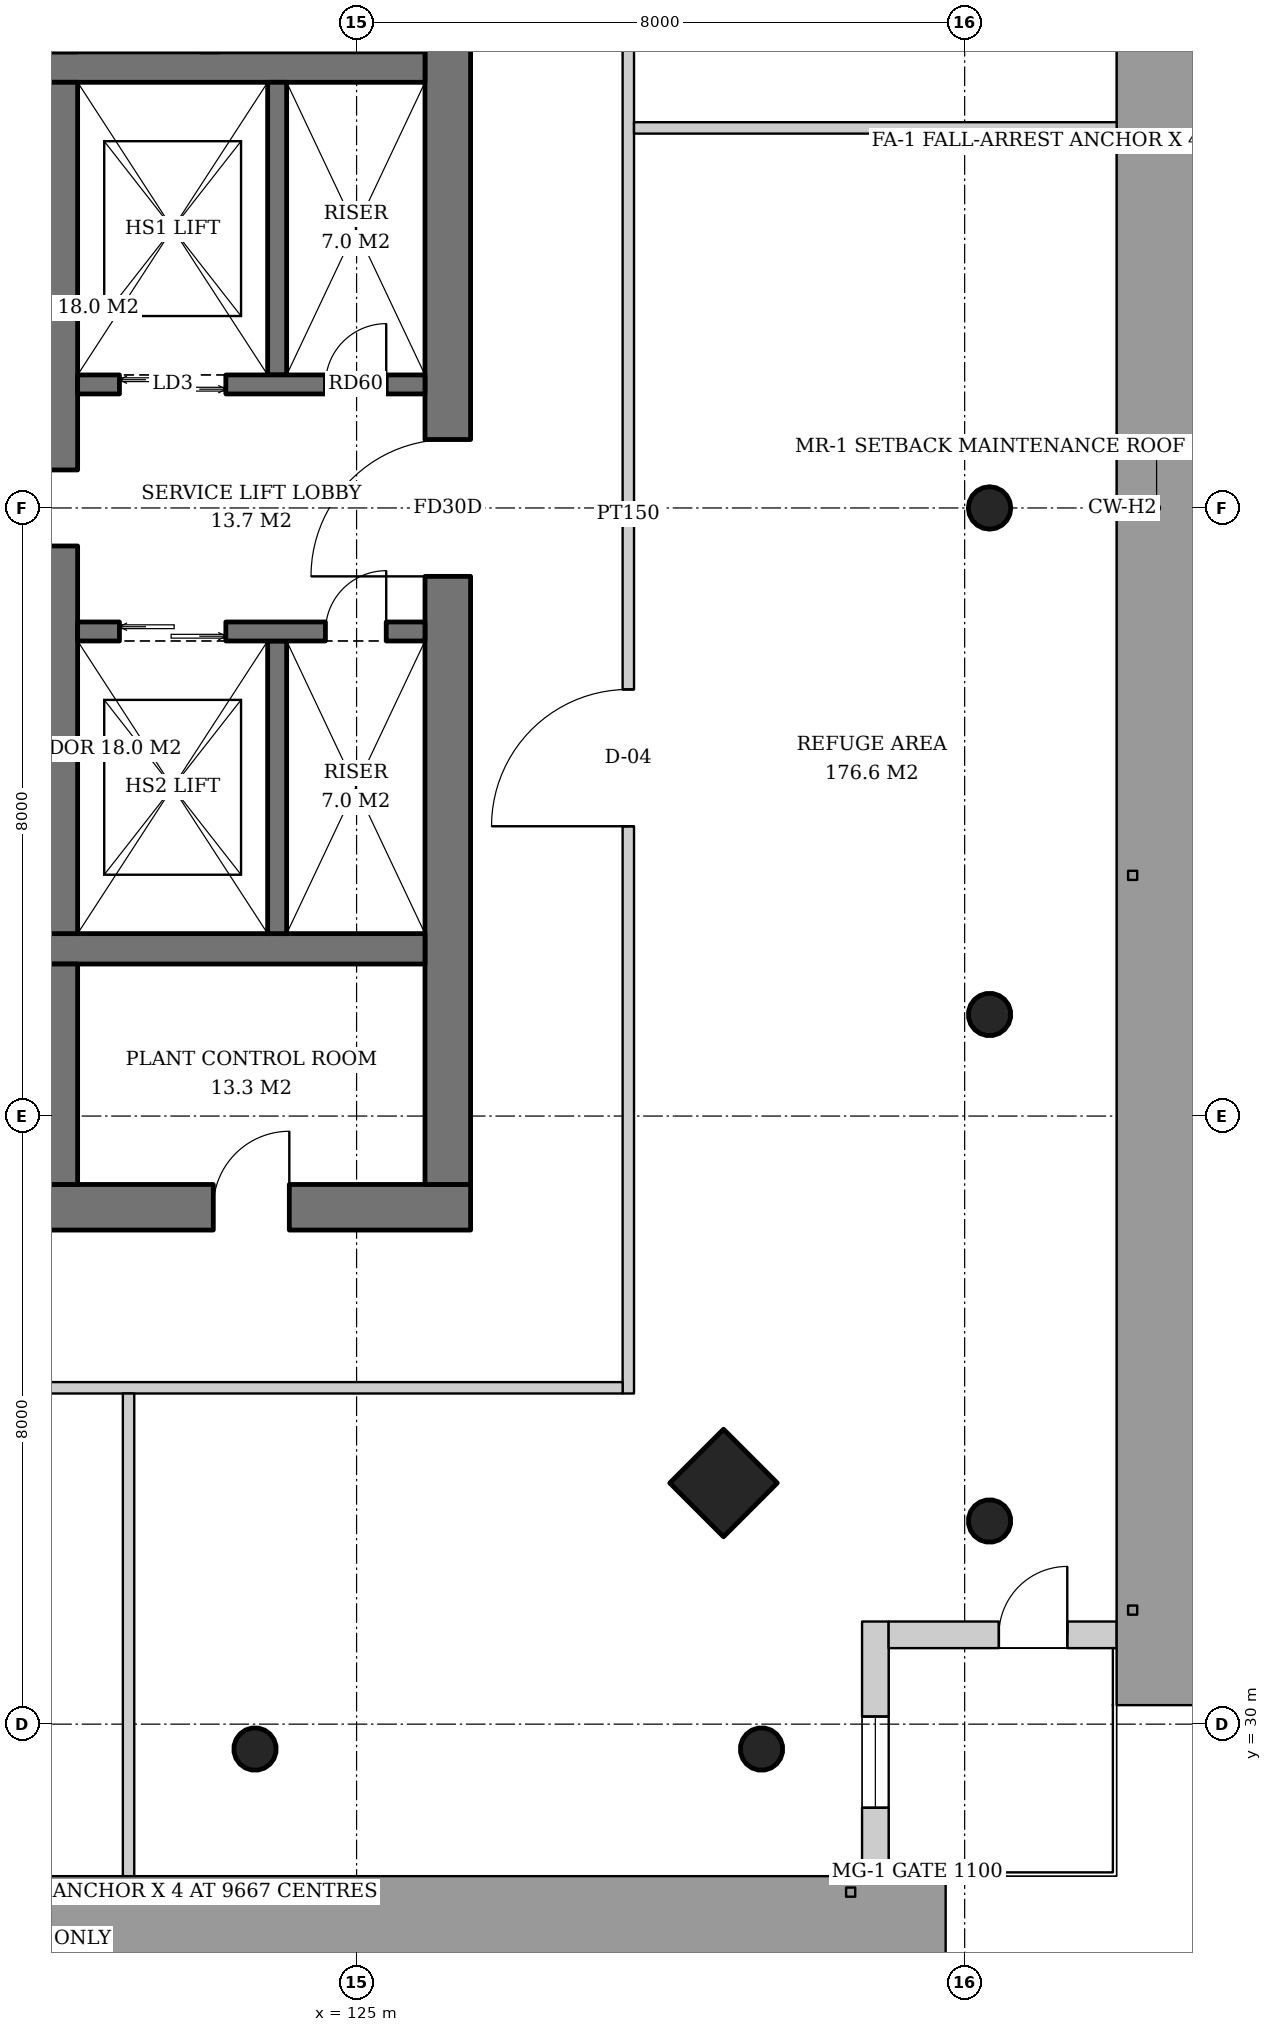
"""IFC4 building model, lengths in metres.
Left out: names, types, materials, properties, quantities, classifications, styles, units other than length and angle.
Written with IfcOpenShell. Run it as: python <this file> out.ifc"""

import sys

from ifc_helpers import new_model, si_unit, direction, frame, frame_2d, origin, origin_2d, place, context, subcontext, project, spatial, rectangle, hollow_circle, extrude, element, fill, save


model = new_model("IFC4")
c1 = context("Model", 3, precision=1e-05, world=origin(), true_north=direction((0.0, 1.0)))
c2 = subcontext(c1, "Body", "Model", "MODEL_VIEW")
j1 = project(units=[si_unit("LENGTHUNIT", "METRE"), si_unit("PLANEANGLEUNIT", "RADIAN")], contexts=[c1])
p1 = place(None, origin())
s1 = spatial("IfcSite", under=j1, at=p1, CompositionType="ELEMENT")
p2 = place(p1, origin())
s2 = spatial("IfcBuilding", under=s1, at=p2, CompositionType="ELEMENT")
p3 = place(p2, frame((0.0, 0.0, 81.8)))
s3 = spatial("IfcBuildingStorey", under=s2, at=p3, CompositionType="ELEMENT", Elevation=81.8)
p4 = place(p3, frame((133.379, 32.621, 0.0), z_axis=(-0.043029647111, 0.043029647111, 0.998146732169), x_axis=(-0.707106781187, -0.707106781187, 0.0)))
e1 = element("IfcColumn", 1, at=p4, inside=s3, PredefinedType="COLUMN", context=c2, shape_type="SweptSolid", body=[
    extrude(hollow_circle(Radius=0.28, WallThickness=0.02, at=origin_2d()), origin(), (0.0, 0.0, 1.0), 3.807),
])
p5 = place(p3, frame((133.379, 39.31, 0.0), z_axis=(-0.043059525333, 0.021561848751, 0.998839808957), x_axis=(-0.44774654769, -0.894160516368, 0.0)))
e2 = element("IfcColumn", 2, at=p5, inside=s3, PredefinedType="COLUMN", context=c2, shape_type="SweptSolid", body=[
    extrude(hollow_circle(Radius=0.28, WallThickness=0.02, at=origin_2d()), origin(), (0.0, 0.0, 1.0), 3.804),
])
p6 = place(p3, frame((133.379, 46.0, 0.0), z_axis=(-0.043069538298, 0.0, 0.999072076915), x_axis=(0.0, -1.0, 0.0)))
e3 = element("IfcColumn", 3, at=p6, inside=s3, PredefinedType="COLUMN", context=c2, shape_type="SweptSolid", body=[
    extrude(hollow_circle(Radius=0.28, WallThickness=0.02, at=origin_2d()), origin(), (0.0, 0.0, 1.0), 3.803),
])
p7 = place(p3, frame((129.879, 33.121, 0.0), z_axis=(-0.043029647111, 0.043029647111, 0.998146732169), x_axis=(-0.707106781187, -0.707106781187, 0.0)))
e4 = element("IfcColumn", 4, at=p7, inside=s3, PredefinedType="COLUMN", context=c2, shape_type="SweptSolid", body=[
    extrude(rectangle(XDim=1.0, YDim=1.0, at=origin_2d()), origin(), (0.0, 0.0, 1.0), 3.807),
])
p8 = place(p3, frame((130.379, 29.621, 0.0), z_axis=(-0.043029647111, 0.043029647111, 0.998146732169), x_axis=(-0.707106781187, -0.707106781187, 0.0)))
e5 = element("IfcColumn", 5, at=p8, inside=s3, PredefinedType="COLUMN", context=c2, shape_type="SweptSolid", body=[
    extrude(hollow_circle(Radius=0.28, WallThickness=0.02, at=origin_2d()), origin(), (0.0, 0.0, 1.0), 3.807),
])
p9 = place(p3, frame((123.69, 29.621, 0.0), z_axis=(-0.021561848751, 0.043059525333, 0.998839808957), x_axis=(-0.894160516368, -0.44774654769, 0.0)))
e6 = element("IfcColumn", 6, at=p9, inside=s3, PredefinedType="COLUMN", context=c2, shape_type="SweptSolid", body=[
    extrude(hollow_circle(Radius=0.28, WallThickness=0.02, at=origin_2d()), origin(), (0.0, 0.0, 1.0), 3.804),
])
p10 = place(p3, frame((107.5, 36.8, 0.0), z_axis=(0.0, 0.0, 1.0), x_axis=(1.0, 0.0, 0.0)))
e7 = element("IfcWall", 7, at=p10, inside=s3, PredefinedType="SHEAR", context=c2, shape_type="SweptSolid", body=[
    extrude(rectangle(XDim=19.0, YDim=0.6, at=frame_2d((9.5, 0.0))), origin(), (0.0, 0.0, 1.0), 3.8),
])
p11 = place(p10, frame((3.9, 0.0, 0.0)))
e8 = element("IfcOpeningElement", 8, at=p11, cuts=e7, PredefinedType="OPENING", context=c2, shape_type="SweptSolid", body=[
    extrude(rectangle(XDim=1.0, YDim=2.1, at=frame_2d((0.5, 1.05))), frame((0.0, 0.31, 0.0), z_axis=(0.0, -1.0, 0.0), x_axis=(1.0, 0.0, 0.0)), (0.0, 0.0, 1.0), 0.62),
])
p12 = place(p10, frame((15.615, 0.0, 0.0)))
e9 = element("IfcOpeningElement", 9, at=p12, cuts=e7, PredefinedType="OPENING", context=c2, shape_type="SweptSolid", body=[
    extrude(rectangle(XDim=1.0, YDim=2.1, at=frame_2d((0.5, 1.05))), frame((0.0, 0.31, 0.0), z_axis=(0.0, -1.0, 0.0), x_axis=(1.0, 0.0, 0.0)), (0.0, 0.0, 1.0), 0.62),
])
p13 = place(p3, frame((126.2, 37.1, 0.0), z_axis=(0.0, 0.0, 1.0), x_axis=(0.0, 1.0, 0.0)))
e10 = element("IfcWall", 10, at=p13, inside=s3, PredefinedType="SHEAR", context=c2, shape_type="SweptSolid", body=[
    extrude(rectangle(XDim=17.8, YDim=0.6, at=frame_2d((8.9, 0.0))), origin(), (0.0, 0.0, 1.0), 3.8),
])
p14 = place(p13, frame((8.0, 0.0, 0.0)))
e11 = element("IfcOpeningElement", 11, at=p14, cuts=e10, PredefinedType="OPENING", context=c2, shape_type="SweptSolid", body=[
    extrude(rectangle(XDim=1.8, YDim=2.4, at=frame_2d((0.9, 1.2))), frame((0.0, 0.31, 0.0), z_axis=(0.0, -1.0, 0.0), x_axis=(1.0, 0.0, 0.0)), (0.0, 0.0, 1.0), 0.62),
])
p15 = place(p3, frame((108.1, 40.2, 0.0), z_axis=(0.0, 0.0, 1.0), x_axis=(1.0, 0.0, 0.0)))
e12 = element("IfcWall", 12, at=p15, inside=s3, PredefinedType="SHEAR", context=c2, shape_type="SweptSolid", body=[
    extrude(rectangle(XDim=17.8, YDim=0.4, at=frame_2d((8.9, 0.0))), origin(), (0.0, 0.0, 1.0), 3.8),
])
p16 = place(p15, frame((3.3, 0.0, 0.0)))
e13 = element("IfcOpeningElement", 13, at=p16, cuts=e12, PredefinedType="OPENING", context=c2, shape_type="SweptSolid", body=[
    extrude(rectangle(XDim=1.0, YDim=2.1, at=frame_2d((0.5, 1.05))), frame((0.0, 0.21, 0.0), z_axis=(0.0, -1.0, 0.0), x_axis=(1.0, 0.0, 0.0)), (0.0, 0.0, 1.0), 0.42),
])
p17 = place(p3, frame((108.1, 51.8, 0.0), z_axis=(0.0, 0.0, 1.0), x_axis=(1.0, 0.0, 0.0)))
e14 = element("IfcWall", 14, at=p17, inside=s3, PredefinedType="SHEAR", context=c2, shape_type="SweptSolid", body=[
    extrude(rectangle(XDim=17.8, YDim=0.4, at=frame_2d((8.9, 0.0))), origin(), (0.0, 0.0, 1.0), 3.8),
])
p18 = place(p17, frame((11.33, 0.0, 0.0)))
e15 = element("IfcOpeningElement", 15, at=p18, cuts=e14, PredefinedType="OPENING", context=c2, shape_type="SweptSolid", body=[
    extrude(rectangle(XDim=1.0, YDim=2.1, at=frame_2d((0.5, 1.05))), frame((0.0, 0.21, 0.0), z_axis=(0.0, -1.0, 0.0), x_axis=(1.0, 0.0, 0.0)), (0.0, 0.0, 1.0), 0.42),
])
p19 = place(p3, frame((121.13, 37.1, 0.0), z_axis=(0.0, 0.0, 1.0), x_axis=(0.0, 1.0, 0.0)))
e16 = element("IfcWall", 16, at=p19, inside=s3, PredefinedType="SHEAR", context=c2, shape_type="SweptSolid", body=[
    extrude(rectangle(XDim=2.9, YDim=0.4, at=frame_2d((1.45, 0.0))), origin(), (0.0, 0.0, 1.0), 3.8),
])
p20 = place(p3, frame((121.13, 40.4, 0.0), z_axis=(0.0, 0.0, 1.0), x_axis=(0.0, 1.0, 0.0)))
e17 = element("IfcWall", 17, at=p20, inside=s3, PredefinedType="SHEAR", context=c2, shape_type="SweptSolid", body=[
    extrude(rectangle(XDim=11.2, YDim=0.4, at=frame_2d((5.6, 0.0))), origin(), (0.0, 0.0, 1.0), 3.8),
])
p21 = place(p20, frame((5.1, 0.0, 0.0)))
e18 = element("IfcOpeningElement", 18, at=p21, cuts=e17, PredefinedType="OPENING", context=c2, shape_type="SweptSolid", body=[
    extrude(rectangle(XDim=1.0, YDim=2.1, at=frame_2d((0.5, 1.05))), frame((0.0, 0.21, 0.0), z_axis=(0.0, -1.0, 0.0), x_axis=(1.0, 0.0, 0.0)), (0.0, 0.0, 1.0), 0.42),
])
p22 = place(p3, frame((131.825, 28.0, 0.0), z_axis=(0.0, 0.0, 1.0), x_axis=(0.0, 1.0, 0.0)))
e19 = element("IfcWall", 19, at=p22, inside=s3, PredefinedType="SOLIDWALL", context=c2, shape_type="SweptSolid", body=[
    extrude(rectangle(XDim=3.35, YDim=0.35, at=frame_2d((1.675, 0.0))), origin(), (0.0, 0.0, 1.0), 3.52),
])
p23 = place(p22, frame((0.9, 0.0, 0.6)))
e20 = element("IfcOpeningElement", 20, at=p23, cuts=e19, PredefinedType="OPENING", context=c2, shape_type="SweptSolid", body=[
    extrude(rectangle(XDim=1.2, YDim=2.55, at=frame_2d((0.6, 1.275))), frame((0.0, 0.185, 0.0), z_axis=(0.0, -1.0, 0.0), x_axis=(1.0, 0.0, 0.0)), (0.0, 0.0, 1.0), 0.37),
])
p24 = place(p3, frame((132.0, 31.175, 0.0), z_axis=(0.0, 0.0, 1.0), x_axis=(1.0, 0.0, 0.0)))
e21 = element("IfcWall", 21, at=p24, inside=s3, PredefinedType="SOLIDWALL", context=c2, shape_type="SweptSolid", body=[
    extrude(rectangle(XDim=3.0, YDim=0.35, at=frame_2d((1.5, 0.0))), origin(), (0.0, 0.0, 1.0), 3.52),
])
p25 = place(p24, frame((1.45, 0.0, 0.0)))
e22 = element("IfcOpeningElement", 22, at=p25, cuts=e21, PredefinedType="OPENING", context=c2, shape_type="SweptSolid", body=[
    extrude(rectangle(XDim=0.9, YDim=2.1, at=frame_2d((0.45, 1.05))), frame((0.0, 0.185, 0.0), z_axis=(0.0, -1.0, 0.0), x_axis=(1.0, 0.0, 0.0)), (0.0, 0.0, 1.0), 0.37),
])
p26 = place(p3, frame((123.955, 47.75, 0.0), z_axis=(0.0, 0.0, 1.0), x_axis=(0.0, 1.0, 0.0)))
e23 = element("IfcWall", 23, at=p26, inside=s3, PredefinedType="SHEAR", context=c2, shape_type="SweptSolid", body=[
    extrude(rectangle(XDim=3.85, YDim=0.25, at=frame_2d((1.925, 0.0))), origin(), (0.0, 0.0, 1.0), 3.8),
])
p27 = place(p3, frame((121.33, 47.625, 0.0), z_axis=(0.0, 0.0, 1.0), x_axis=(1.0, 0.0, 0.0)))
e24 = element("IfcWall", 24, at=p27, inside=s3, PredefinedType="SHEAR", context=c2, shape_type="SweptSolid", body=[
    extrude(rectangle(XDim=4.57, YDim=0.25, at=frame_2d((2.285, 0.0))), origin(), (0.0, 0.0, 1.0), 3.8),
])
p28 = place(p27, frame((0.55, 0.0, 0.0)))
e25 = element("IfcOpeningElement", 25, at=p28, cuts=e24, PredefinedType="OPENING", context=c2, shape_type="SweptSolid", body=[
    extrude(rectangle(XDim=1.4, YDim=2.4, at=frame_2d((0.7, 1.2))), frame((0.0, 0.135, 0.0), z_axis=(0.0, -1.0, 0.0), x_axis=(1.0, 0.0, 0.0)), (0.0, 0.0, 1.0), 0.27),
])
p29 = place(p27, frame((3.26, 0.0, 0.0)))
e26 = element("IfcOpeningElement", 26, at=p29, cuts=e24, PredefinedType="OPENING", context=c2, shape_type="SweptSolid", body=[
    extrude(rectangle(XDim=0.8, YDim=2.0, at=frame_2d((0.4, 1.0))), frame((0.0, 0.135, 0.0), z_axis=(0.0, -1.0, 0.0), x_axis=(1.0, 0.0, 0.0)), (0.0, 0.0, 1.0), 0.27),
])
p30 = place(p3, frame((123.955, 44.25, 0.0), z_axis=(0.0, 0.0, 1.0), x_axis=(0.0, -1.0, 0.0)))
e27 = element("IfcWall", 27, at=p30, inside=s3, PredefinedType="SHEAR", context=c2, shape_type="SweptSolid", body=[
    extrude(rectangle(XDim=3.85, YDim=0.25, at=frame_2d((1.925, 0.0))), origin(), (0.0, 0.0, 1.0), 3.8),
])
p31 = place(p3, frame((121.33, 44.375, 0.0), z_axis=(0.0, 0.0, 1.0), x_axis=(1.0, 0.0, 0.0)))
e28 = element("IfcWall", 28, at=p31, inside=s3, PredefinedType="SHEAR", context=c2, shape_type="SweptSolid", body=[
    extrude(rectangle(XDim=4.57, YDim=0.25, at=frame_2d((2.285, 0.0))), origin(), (0.0, 0.0, 1.0), 3.8),
])
p32 = place(p31, frame((0.55, 0.0, 0.0)))
e29 = element("IfcOpeningElement", 29, at=p32, cuts=e28, PredefinedType="OPENING", context=c2, shape_type="SweptSolid", body=[
    extrude(rectangle(XDim=1.4, YDim=2.4, at=frame_2d((0.7, 1.2))), frame((0.0, 0.135, 0.0), z_axis=(0.0, -1.0, 0.0), x_axis=(1.0, 0.0, 0.0)), (0.0, 0.0, 1.0), 0.27),
])
p33 = place(p31, frame((3.26, 0.0, 0.0)))
e30 = element("IfcOpeningElement", 30, at=p33, cuts=e28, PredefinedType="OPENING", context=c2, shape_type="SweptSolid", body=[
    extrude(rectangle(XDim=0.8, YDim=2.0, at=frame_2d((0.4, 1.0))), frame((0.0, 0.135, 0.0), z_axis=(0.0, -1.0, 0.0), x_axis=(1.0, 0.0, 0.0)), (0.0, 0.0, 1.0), 0.27),
])
p34 = place(p3, frame((128.575, 34.35, 0.0), z_axis=(0.0, 0.0, 1.0), x_axis=(0.0, 1.0, 0.0)))
e31 = element("IfcWall", 31, at=p34, inside=s3, PredefinedType="PARTITIONING", context=c2, shape_type="SweptSolid", body=[
    extrude(rectangle(XDim=23.15, YDim=0.15, at=frame_2d((11.575, 0.0))), origin(), (0.0, 0.0, 1.0), 2.82),
])
p35 = place(p34, frame((7.462, 0.0, 0.0)))
e32 = element("IfcOpeningElement", 32, at=p35, cuts=e31, PredefinedType="OPENING", context=c2, shape_type="SweptSolid", body=[
    extrude(rectangle(XDim=1.8, YDim=2.4, at=frame_2d((0.9, 1.2))), frame((0.0, 0.085, 0.0), z_axis=(0.0, -1.0, 0.0), x_axis=(1.0, 0.0, 0.0)), (0.0, 0.0, 1.0), 0.17),
])
p36 = place(p3, frame((128.65, 51.0, 0.0), z_axis=(0.0, 0.0, 1.0), x_axis=(1.0, 0.0, 0.0)))
e33 = element("IfcWall", 33, at=p36, inside=s3, PredefinedType="PARTITIONING", context=c2, shape_type="SweptSolid", body=[
    extrude(rectangle(XDim=6.39, YDim=0.15, at=frame_2d((3.195, 0.0))), origin(), (0.0, 0.0, 1.0), 3.12),
])
p37 = place(p3, frame((105.35, 34.425, 0.0), z_axis=(0.0, 0.0, 1.0), x_axis=(1.0, 0.0, 0.0)))
e34 = element("IfcWall", 34, at=p37, inside=s3, PredefinedType="PARTITIONING", context=c2, shape_type="SweptSolid", body=[
    extrude(rectangle(XDim=23.15, YDim=0.15, at=frame_2d((11.575, 0.0))), origin(), (0.0, 0.0, 1.0), 2.82),
])
p38 = place(p37, frame((7.462, 0.0, 0.0)))
e35 = element("IfcOpeningElement", 35, at=p38, cuts=e34, PredefinedType="OPENING", context=c2, shape_type="SweptSolid", body=[
    extrude(rectangle(XDim=1.8, YDim=2.4, at=frame_2d((0.9, 1.2))), frame((0.0, 0.085, 0.0), z_axis=(0.0, -1.0, 0.0), x_axis=(1.0, 0.0, 0.0)), (0.0, 0.0, 1.0), 0.17),
])
p39 = place(p3, frame((122.0, 34.35, 0.0), z_axis=(0.0, 0.0, 1.0), x_axis=(0.0, -1.0, 0.0)))
e36 = element("IfcWall", 36, at=p39, inside=s3, PredefinedType="PARTITIONING", context=c2, shape_type="SweptSolid", body=[
    extrude(rectangle(XDim=6.39, YDim=0.15, at=frame_2d((3.195, 0.0))), origin(), (0.0, 0.0, 1.0), 3.12),
])
p40 = place(p25, origin())
e37 = element("IfcDoor", 37, at=p40, inside=s3, OperationType="SINGLE_SWING_RIGHT", PredefinedType="DOOR", context=c2, shape_type="SweptSolid", body=[
    extrude(rectangle(XDim=0.9, YDim=2.1, at=frame_2d((0.45, 1.05))), frame((0.0, 0.025, 0.0), z_axis=(0.0, -1.0, 0.0), x_axis=(1.0, 0.0, 0.0)), (0.0, 0.0, 1.0), 0.05),
])
fill(e22, e37)
p41 = place(p23, origin())
e38 = element("IfcWindow", 38, at=p41, inside=s3, PartitioningType="SINGLE_PANEL", PredefinedType="USERDEFINED", context=c2, shape_type="SweptSolid", body=[
    extrude(rectangle(XDim=1.2, YDim=2.55, at=frame_2d((0.6, 1.275))), frame((0.0, 0.03, 0.0), z_axis=(0.0, -1.0, 0.0), x_axis=(1.0, 0.0, 0.0)), (0.0, 0.0, 1.0), 0.06),
])
fill(e20, e38)
p42 = place(p28, origin())
e39 = element("IfcDoor", 39, at=p42, inside=s3, OperationType="DOUBLE_DOOR_SLIDING", PredefinedType="DOOR", context=c2, shape_type="SweptSolid", body=[
    extrude(rectangle(XDim=1.4, YDim=2.4, at=frame_2d((0.7, 1.2))), frame((0.0, 0.025, 0.0), z_axis=(0.0, -1.0, 0.0), x_axis=(1.0, 0.0, 0.0)), (0.0, 0.0, 1.0), 0.05),
])
fill(e25, e39)
p43 = place(p29, origin())
e40 = element("IfcDoor", 40, at=p43, inside=s3, OperationType="SINGLE_SWING_RIGHT", PredefinedType="DOOR", context=c2, shape_type="SweptSolid", body=[
    extrude(rectangle(XDim=0.8, YDim=2.0, at=frame_2d((0.4, 1.0))), frame((0.0, 0.025, 0.0), z_axis=(0.0, -1.0, 0.0), x_axis=(1.0, 0.0, 0.0)), (0.0, 0.0, 1.0), 0.05),
])
fill(e26, e40)
p44 = place(p32, origin())
e41 = element("IfcDoor", 41, at=p44, inside=s3, OperationType="DOUBLE_DOOR_SLIDING", PredefinedType="DOOR", context=c2, shape_type="SweptSolid", body=[
    extrude(rectangle(XDim=1.4, YDim=2.4, at=frame_2d((0.7, 1.2))), frame((0.0, 0.025, 0.0), z_axis=(0.0, -1.0, 0.0), x_axis=(1.0, 0.0, 0.0)), (0.0, 0.0, 1.0), 0.05),
])
fill(e29, e41)
p45 = place(p33, origin())
e42 = element("IfcDoor", 42, at=p45, inside=s3, OperationType="SINGLE_SWING_RIGHT", PredefinedType="DOOR", context=c2, shape_type="SweptSolid", body=[
    extrude(rectangle(XDim=0.8, YDim=2.0, at=frame_2d((0.4, 1.0))), frame((0.0, 0.025, 0.0), z_axis=(0.0, -1.0, 0.0), x_axis=(1.0, 0.0, 0.0)), (0.0, 0.0, 1.0), 0.05),
])
fill(e30, e42)
p46 = place(p21, origin())
e43 = element("IfcDoor", 43, at=p46, inside=s3, OperationType="SINGLE_SWING_LEFT", PredefinedType="DOOR", context=c2, shape_type="SweptSolid", body=[
    extrude(rectangle(XDim=1.0, YDim=2.1, at=frame_2d((0.5, 1.05))), frame((0.0, 0.025, 0.0), z_axis=(0.0, -1.0, 0.0), x_axis=(1.0, 0.0, 0.0)), (0.0, 0.0, 1.0), 0.05),
])
fill(e18, e43)
p47 = place(p14, origin())
e44 = element("IfcDoor", 44, at=p47, inside=s3, OperationType="DOUBLE_DOOR_SINGLE_SWING", PredefinedType="DOOR", context=c2, shape_type="SweptSolid", body=[
    extrude(rectangle(XDim=1.8, YDim=2.4, at=frame_2d((0.9, 1.2))), frame((0.0, 0.025, 0.0), z_axis=(0.0, -1.0, 0.0), x_axis=(1.0, 0.0, 0.0)), (0.0, 0.0, 1.0), 0.05),
])
fill(e11, e44)
p48 = place(p12, origin())
e45 = element("IfcDoor", 45, at=p48, inside=s3, OperationType="SINGLE_SWING_RIGHT", PredefinedType="DOOR", context=c2, shape_type="SweptSolid", body=[
    extrude(rectangle(XDim=1.0, YDim=2.1, at=frame_2d((0.5, 1.05))), frame((0.0, 0.29, 0.0), z_axis=(0.0, -1.0, 0.0), x_axis=(1.0, 0.0, 0.0)), (0.0, 0.0, 1.0), 0.05),
])
fill(e9, e45)
p49 = place(p35, origin())
e46 = element("IfcDoor", 46, at=p49, inside=s3, OperationType="DOUBLE_DOOR_SINGLE_SWING", PredefinedType="DOOR", context=c2, shape_type="SweptSolid", body=[
    extrude(rectangle(XDim=1.8, YDim=2.4, at=frame_2d((0.9, 1.2))), frame((0.0, 0.025, 0.0), z_axis=(0.0, -1.0, 0.0), x_axis=(1.0, 0.0, 0.0)), (0.0, 0.0, 1.0), 0.05),
])
fill(e32, e46)
save(model, sys.argv[1])
